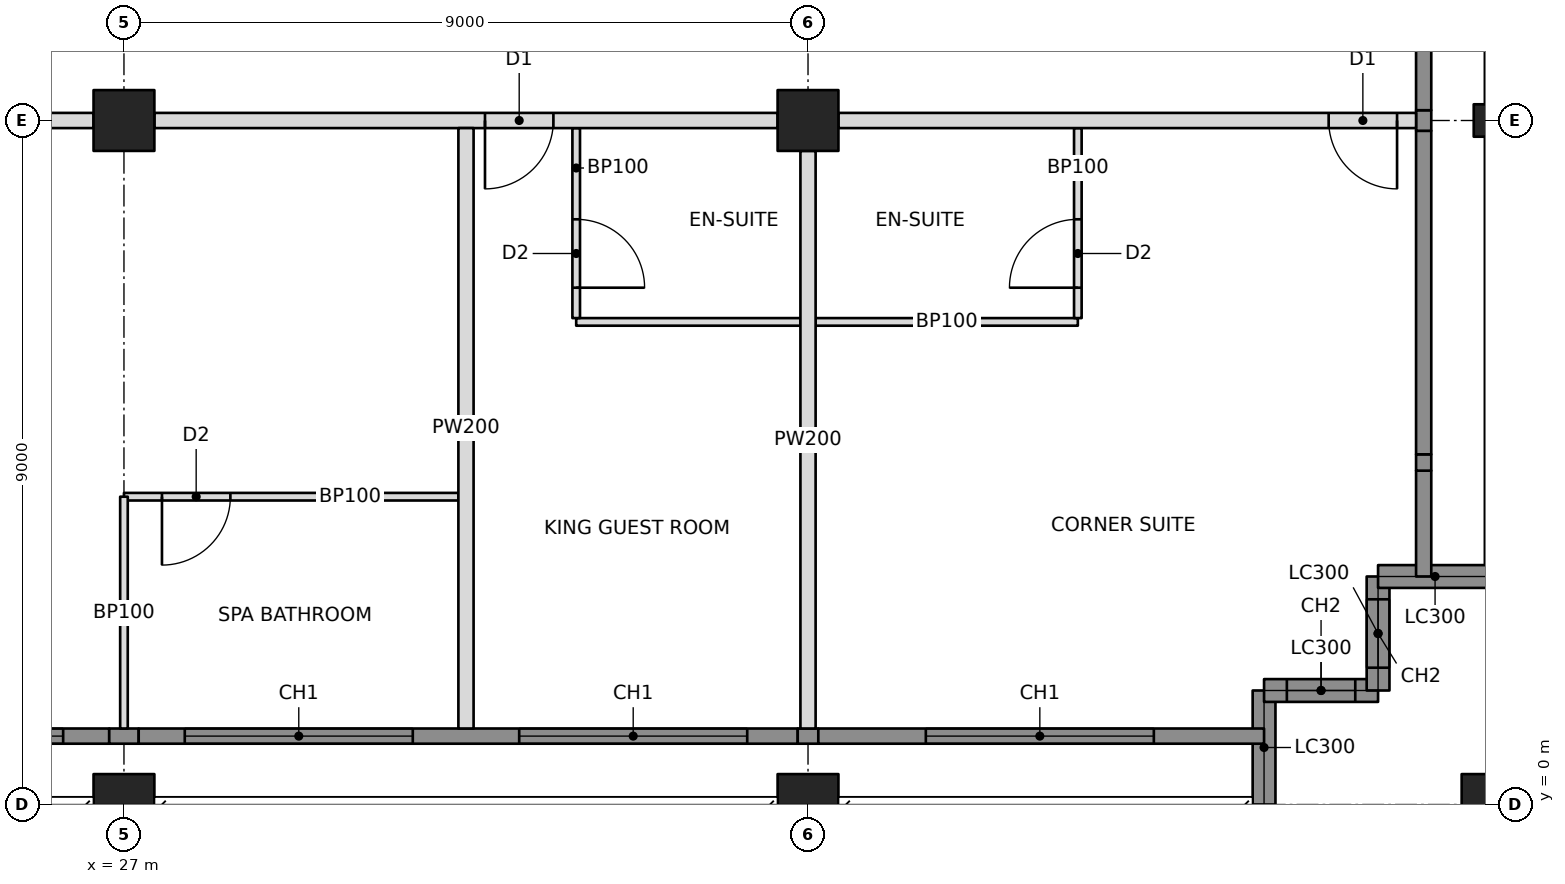
"""IFC4 building model, lengths in metres.
Left out: names, types, materials, properties, quantities, classifications, styles, units other than length and angle.
Written with IfcOpenShell. Run it as: python <this file> out.ifc"""

import sys

from ifc_helpers import new_model, si_unit, direction, frame, frame_2d, origin, origin_2d, place, context, subcontext, project, spatial, rectangle, hollow_rectangle, i_section, extrude, element, fill, save


model = new_model("IFC4")
c1 = context("Model", 3, precision=1e-05, world=origin(), true_north=direction((0.0, 1.0)))
c2 = subcontext(c1, "Body", "Model", "MODEL_VIEW")
j1 = project(units=[si_unit("LENGTHUNIT", "METRE"), si_unit("PLANEANGLEUNIT", "RADIAN")], contexts=[c1])
p1 = place(None, origin())
s1 = spatial("IfcSite", under=j1, at=p1, CompositionType="ELEMENT")
p2 = place(p1, origin())
s2 = spatial("IfcBuilding", under=s1, at=p2, CompositionType="ELEMENT")
p3 = place(p2, frame((0.0, 0.0, 208.0)))
s3 = spatial("IfcBuildingStorey", under=s2, at=p3, CompositionType="ELEMENT", Elevation=208.0)
p4 = place(p3, frame((27.0, 0.0, 0.0), z_axis=(0.0, 0.0, 1.0), x_axis=(1.0, 0.0, 0.0)))
e1 = element("IfcColumn", 1, at=p4, inside=s3, PredefinedType="COLUMN", context=c2, shape_type="SweptSolid", body=[
    extrude(hollow_rectangle(XDim=0.8, YDim=0.8, WallThickness=0.06, at=origin_2d()), origin(), (0.0, 0.0, 1.0), 3.4),
])
p5 = place(p3, frame((27.0, 9.0, 0.0), z_axis=(0.0, 0.0, 1.0), x_axis=(1.0, 0.0, 0.0)))
e2 = element("IfcColumn", 2, at=p5, inside=s3, PredefinedType="COLUMN", context=c2, shape_type="SweptSolid", body=[
    extrude(hollow_rectangle(XDim=0.8, YDim=0.8, WallThickness=0.05, at=origin_2d()), origin(), (0.0, 0.0, 1.0), 3.4),
])
p6 = place(p3, frame((36.0, 0.0, 0.0), z_axis=(0.0, 0.0, 1.0), x_axis=(1.0, 0.0, 0.0)))
e3 = element("IfcColumn", 3, at=p6, inside=s3, PredefinedType="COLUMN", context=c2, shape_type="SweptSolid", body=[
    extrude(hollow_rectangle(XDim=0.8, YDim=0.8, WallThickness=0.06, at=origin_2d()), origin(), (0.0, 0.0, 1.0), 3.4),
])
p7 = place(p3, frame((36.0, 9.0, 0.0), z_axis=(0.0, 0.0, 1.0), x_axis=(0.0, 1.0, 0.0)))
e4 = element("IfcColumn", 4, at=p7, inside=s3, PredefinedType="COLUMN", context=c2, shape_type="SweptSolid", body=[
    extrude(hollow_rectangle(XDim=0.8, YDim=0.8, WallThickness=0.05, at=origin_2d()), origin(), (0.0, 0.0, 1.0), 3.4),
])
p8 = place(p3, frame((45.0, 0.0, 0.0), z_axis=(0.0, 0.0, 1.0), x_axis=(1.0, 0.0, 0.0)))
e5 = element("IfcColumn", 5, at=p8, inside=s3, PredefinedType="COLUMN", context=c2, shape_type="SweptSolid", body=[
    extrude(hollow_rectangle(XDim=0.8, YDim=0.8, WallThickness=0.06, at=origin_2d()), origin(), (0.0, 0.0, 1.0), 3.4),
])
p9 = place(p3, frame((45.0, 9.0, 0.0), z_axis=(0.0, 0.0, 1.0), x_axis=(0.0, 1.0, 0.0)))
e6 = element("IfcColumn", 6, at=p9, inside=s3, PredefinedType="COLUMN", context=c2, shape_type="SweptSolid", body=[
    extrude(i_section(OverallWidth=0.427, OverallDepth=0.483, WebThickness=0.051, FlangeThickness=0.082, at=origin_2d()), origin(), (0.0, 0.0, 1.0), 3.4),
])
p10 = place(p3, frame((42.0, 0.0, 0.0), z_axis=(0.0, 0.0, 1.0), x_axis=(0.0, 1.0, 0.0)))
e7 = element("IfcWall", 7, at=p10, inside=s3, PredefinedType="SOLIDWALL", context=c2, shape_type="SweptSolid", body=[
    extrude(rectangle(XDim=1.5, YDim=0.3, at=frame_2d((0.75, 0.0))), origin(), (0.0, 0.0, 1.0), 2.42),
])
p11 = place(p3, frame((42.0, 1.5, 0.0), z_axis=(0.0, 0.0, 1.0), x_axis=(1.0, 0.0, 0.0)))
e8 = element("IfcWall", 8, at=p11, inside=s3, PredefinedType="SOLIDWALL", context=c2, shape_type="SweptSolid", body=[
    extrude(rectangle(XDim=1.5, YDim=0.3, at=frame_2d((0.75, 0.0))), origin(), (0.0, 0.0, 1.0), 3.2),
])
p12 = place(p11, frame((0.3, 0.0, 0.6)))
e9 = element("IfcOpeningElement", 9, at=p12, cuts=e8, PredefinedType="OPENING", context=c2, shape_type="SweptSolid", body=[
    extrude(rectangle(XDim=0.9, YDim=2.2, at=frame_2d((0.45, 1.1))), frame((0.0, 0.16, 0.0), z_axis=(0.0, -1.0, 0.0), x_axis=(1.0, 0.0, 0.0)), (0.0, 0.0, 1.0), 0.32),
])
p13 = place(p3, frame((43.5, 1.5, 0.0), z_axis=(0.0, 0.0, 1.0), x_axis=(0.0, 1.0, 0.0)))
e10 = element("IfcWall", 10, at=p13, inside=s3, PredefinedType="SOLIDWALL", context=c2, shape_type="SweptSolid", body=[
    extrude(rectangle(XDim=1.5, YDim=0.3, at=frame_2d((0.75, 0.0))), origin(), (0.0, 0.0, 1.0), 3.2),
])
p14 = place(p13, frame((0.3, 0.0, 0.6)))
e11 = element("IfcOpeningElement", 11, at=p14, cuts=e10, PredefinedType="OPENING", context=c2, shape_type="SweptSolid", body=[
    extrude(rectangle(XDim=0.9, YDim=2.2, at=frame_2d((0.45, 1.1))), frame((0.0, 0.16, 0.0), z_axis=(0.0, -1.0, 0.0), x_axis=(1.0, 0.0, 0.0)), (0.0, 0.0, 1.0), 0.32),
])
p15 = place(p3, frame((43.5, 3.0, 0.0), z_axis=(0.0, 0.0, 1.0), x_axis=(1.0, 0.0, 0.0)))
e12 = element("IfcWall", 12, at=p15, inside=s3, PredefinedType="SOLIDWALL", context=c2, shape_type="SweptSolid", body=[
    extrude(rectangle(XDim=1.5, YDim=0.3, at=frame_2d((0.75, 0.0))), origin(), (0.0, 0.0, 1.0), 2.42),
])
p16 = place(p3, frame((44.1, 3.0, 0.0), z_axis=(0.0, 0.0, 1.0), x_axis=(0.0, 1.0, 0.0)))
e13 = element("IfcWall", 13, at=p16, inside=s3, PredefinedType="SOLIDWALL", context=c2, shape_type="SweptSolid", body=[
    extrude(rectangle(XDim=1.393, YDim=0.2, at=frame_2d((0.696, 0.0))), origin(), (0.0, 0.0, 1.0), 3.2),
])
p17 = place(p3, frame((18.4, 9.0, 0.0), z_axis=(0.0, 0.0, 1.0), x_axis=(1.0, 0.0, 0.0)))
e14 = element("IfcWall", 14, at=p17, inside=s3, PredefinedType="PARTITIONING", context=c2, shape_type="SweptSolid", body=[
    extrude(rectangle(XDim=8.2, YDim=0.2, at=frame_2d((4.1, 0.0))), origin(), (0.0, 0.0, 1.0), 2.405),
])
p18 = place(p17, frame((4.35, 0.0, 0.0)))
e15 = element("IfcOpeningElement", 15, at=p18, cuts=e14, PredefinedType="OPENING", context=c2, shape_type="SweptSolid", body=[
    extrude(rectangle(XDim=0.9, YDim=2.1, at=frame_2d((0.45, 1.05))), frame((0.0, 0.11, 0.0), z_axis=(0.0, -1.0, 0.0), x_axis=(1.0, 0.0, 0.0)), (0.0, 0.0, 1.0), 0.22),
])
p19 = place(p3, frame((27.4, 9.0, 0.0), z_axis=(0.0, 0.0, 1.0), x_axis=(1.0, 0.0, 0.0)))
e16 = element("IfcWall", 16, at=p19, inside=s3, PredefinedType="PARTITIONING", context=c2, shape_type="SweptSolid", body=[
    extrude(rectangle(XDim=8.2, YDim=0.2, at=frame_2d((4.1, 0.0))), origin(), (0.0, 0.0, 1.0), 2.405),
])
p20 = place(p19, frame((4.35, 0.0, 0.0)))
e17 = element("IfcOpeningElement", 17, at=p20, cuts=e16, PredefinedType="OPENING", context=c2, shape_type="SweptSolid", body=[
    extrude(rectangle(XDim=0.9, YDim=2.1, at=frame_2d((0.45, 1.05))), frame((0.0, 0.11, 0.0), z_axis=(0.0, -1.0, 0.0), x_axis=(1.0, 0.0, 0.0)), (0.0, 0.0, 1.0), 0.22),
])
p21 = place(p3, frame((36.4, 9.0, 0.0), z_axis=(0.0, 0.0, 1.0), x_axis=(1.0, 0.0, 0.0)))
e18 = element("IfcWall", 18, at=p21, inside=s3, PredefinedType="PARTITIONING", context=c2, shape_type="SweptSolid", body=[
    extrude(rectangle(XDim=7.6, YDim=0.2, at=frame_2d((3.8, 0.0))), origin(), (0.0, 0.0, 1.0), 2.438),
])
p22 = place(p21, frame((6.45, 0.0, 0.0)))
e19 = element("IfcOpeningElement", 19, at=p22, cuts=e18, PredefinedType="OPENING", context=c2, shape_type="SweptSolid", body=[
    extrude(rectangle(XDim=0.9, YDim=2.1, at=frame_2d((0.45, 1.05))), frame((0.0, 0.11, 0.0), z_axis=(0.0, -1.0, 0.0), x_axis=(1.0, 0.0, 0.0)), (0.0, 0.0, 1.0), 0.22),
])
p23 = place(p3, frame((31.5, 8.9, 0.0), z_axis=(0.0, 0.0, 1.0), x_axis=(0.0, -1.0, 0.0)))
e20 = element("IfcWall", 20, at=p23, inside=s3, PredefinedType="PARTITIONING", context=c2, shape_type="SweptSolid", body=[
    extrude(rectangle(XDim=7.9, YDim=0.2, at=frame_2d((3.95, 0.0))), origin(), (0.0, 0.0, 1.0), 2.404),
])
p24 = place(p3, frame((36.0, 8.6, 0.0), z_axis=(0.0, 0.0, 1.0), x_axis=(0.0, -1.0, 0.0)))
e21 = element("IfcWall", 21, at=p24, inside=s3, PredefinedType="PARTITIONING", context=c2, shape_type="SweptSolid", body=[
    extrude(rectangle(XDim=7.6, YDim=0.2, at=frame_2d((3.8, 0.0))), origin(), (0.0, 0.0, 1.0), 2.438),
])
p25 = place(p3, frame((27.0, 4.05, 0.0), z_axis=(0.0, 0.0, 1.0), x_axis=(1.0, 0.0, 0.0)))
e22 = element("IfcWall", 22, at=p25, inside=s3, PredefinedType="PARTITIONING", context=c2, shape_type="SweptSolid", body=[
    extrude(rectangle(XDim=4.4, YDim=0.1, at=frame_2d((2.2, 0.0))), origin(), (0.0, 0.0, 1.0), 2.404),
])
p26 = place(p25, frame((0.5, 0.0, 0.0)))
e23 = element("IfcOpeningElement", 23, at=p26, cuts=e22, PredefinedType="OPENING", context=c2, shape_type="SweptSolid", body=[
    extrude(rectangle(XDim=0.9, YDim=2.1, at=frame_2d((0.45, 1.05))), frame((0.0, 0.06, 0.0), z_axis=(0.0, -1.0, 0.0), x_axis=(1.0, 0.0, 0.0)), (0.0, 0.0, 1.0), 0.12),
])
p27 = place(p3, frame((27.0, 4.05, 0.0), z_axis=(0.0, 0.0, 1.0), x_axis=(0.0, -1.0, 0.0)))
e24 = element("IfcWall", 24, at=p27, inside=s3, PredefinedType="PARTITIONING", context=c2, shape_type="SweptSolid", body=[
    extrude(rectangle(XDim=3.05, YDim=0.1, at=frame_2d((1.525, 0.0))), origin(), (0.0, 0.0, 1.0), 2.405),
])
p28 = place(p3, frame((32.95, 6.35, 0.0), z_axis=(0.0, 0.0, 1.0), x_axis=(1.0, 0.0, 0.0)))
e25 = element("IfcWall", 25, at=p28, inside=s3, PredefinedType="PARTITIONING", context=c2, shape_type="SweptSolid", body=[
    extrude(rectangle(XDim=2.95, YDim=0.1, at=frame_2d((1.475, 0.0))), origin(), (0.0, 0.0, 1.0), 2.438),
])
p29 = place(p3, frame((32.95, 8.9, 0.0), z_axis=(0.0, 0.0, 1.0), x_axis=(0.0, -1.0, 0.0)))
e26 = element("IfcWall", 26, at=p29, inside=s3, PredefinedType="PARTITIONING", context=c2, shape_type="SweptSolid", body=[
    extrude(rectangle(XDim=2.5, YDim=0.1, at=frame_2d((1.25, 0.0))), origin(), (0.0, 0.0, 1.0), 2.404),
])
p30 = place(p29, frame((1.2, 0.0, 0.0)))
e27 = element("IfcOpeningElement", 27, at=p30, cuts=e26, PredefinedType="OPENING", context=c2, shape_type="SweptSolid", body=[
    extrude(rectangle(XDim=0.9, YDim=2.1, at=frame_2d((0.45, 1.05))), frame((0.0, 0.06, 0.0), z_axis=(0.0, -1.0, 0.0), x_axis=(1.0, 0.0, 0.0)), (0.0, 0.0, 1.0), 0.12),
])
p31 = place(p3, frame((36.1, 6.35, 0.0), z_axis=(0.0, 0.0, 1.0), x_axis=(1.0, 0.0, 0.0)))
e28 = element("IfcWall", 28, at=p31, inside=s3, PredefinedType="PARTITIONING", context=c2, shape_type="SweptSolid", body=[
    extrude(rectangle(XDim=3.45, YDim=0.1, at=frame_2d((1.725, 0.0))), origin(), (0.0, 0.0, 1.0), 2.438),
])
p32 = place(p3, frame((39.55, 8.9, 0.0), z_axis=(0.0, 0.0, 1.0), x_axis=(0.0, -1.0, 0.0)))
e29 = element("IfcWall", 29, at=p32, inside=s3, PredefinedType="PARTITIONING", context=c2, shape_type="SweptSolid", body=[
    extrude(rectangle(XDim=2.5, YDim=0.1, at=frame_2d((1.25, 0.0))), origin(), (0.0, 0.0, 1.0), 2.438),
])
p33 = place(p32, frame((1.2, 0.0, 0.0)))
e30 = element("IfcOpeningElement", 30, at=p33, cuts=e29, PredefinedType="OPENING", context=c2, shape_type="SweptSolid", body=[
    extrude(rectangle(XDim=0.9, YDim=2.1, at=frame_2d((0.45, 1.05))), frame((0.0, 0.06, 0.0), z_axis=(0.0, -1.0, 0.0), x_axis=(1.0, 0.0, 0.0)), (0.0, 0.0, 1.0), 0.12),
])
p34 = place(p3, frame((18.194, 0.9, 0.0), z_axis=(0.0, 0.0, 1.0), x_axis=(1.0, 0.0, 0.0)))
e31 = element("IfcWall", 31, at=p34, inside=s3, PredefinedType="SOLIDWALL", context=c2, shape_type="SweptSolid", body=[
    extrude(rectangle(XDim=8.612, YDim=0.2, at=frame_2d((4.306, 0.0))), origin(), (0.0, 0.0, 1.0), 3.2),
])
p35 = place(p34, frame((0.606, 0.0, 0.6)))
e32 = element("IfcOpeningElement", 32, at=p35, cuts=e31, PredefinedType="OPENING", context=c2, shape_type="SweptSolid", body=[
    extrude(rectangle(XDim=3.0, YDim=2.2, at=frame_2d((1.5, 1.1))), frame((0.0, 0.11, 0.0), z_axis=(0.0, -1.0, 0.0), x_axis=(1.0, 0.0, 0.0)), (0.0, 0.0, 1.0), 0.22),
])
p36 = place(p34, frame((5.006, 0.0, 0.6)))
e33 = element("IfcOpeningElement", 33, at=p36, cuts=e31, PredefinedType="OPENING", context=c2, shape_type="SweptSolid", body=[
    extrude(rectangle(XDim=3.0, YDim=2.2, at=frame_2d((1.5, 1.1))), frame((0.0, 0.11, 0.0), z_axis=(0.0, -1.0, 0.0), x_axis=(1.0, 0.0, 0.0)), (0.0, 0.0, 1.0), 0.22),
])
p37 = place(p3, frame((26.806, 0.9, 0.0), z_axis=(0.0, 0.0, 1.0), x_axis=(1.0, 0.0, 0.0)))
e34 = element("IfcWall", 34, at=p37, inside=s3, PredefinedType="SOLIDWALL", context=c2, shape_type="SweptSolid", body=[
    extrude(rectangle(XDim=0.388, YDim=0.2, at=frame_2d((0.194, 0.0))), origin(), (0.0, 0.0, 1.0), 2.404),
])
p38 = place(p3, frame((27.194, 0.9, 0.0), z_axis=(0.0, 0.0, 1.0), x_axis=(1.0, 0.0, 0.0)))
e35 = element("IfcWall", 35, at=p38, inside=s3, PredefinedType="SOLIDWALL", context=c2, shape_type="SweptSolid", body=[
    extrude(rectangle(XDim=8.671, YDim=0.2, at=frame_2d((4.335, 0.0))), origin(), (0.0, 0.0, 1.0), 3.2),
])
p39 = place(p38, frame((0.606, 0.0, 0.6)))
e36 = element("IfcOpeningElement", 36, at=p39, cuts=e35, PredefinedType="OPENING", context=c2, shape_type="SweptSolid", body=[
    extrude(rectangle(XDim=3.0, YDim=2.2, at=frame_2d((1.5, 1.1))), frame((0.0, 0.11, 0.0), z_axis=(0.0, -1.0, 0.0), x_axis=(1.0, 0.0, 0.0)), (0.0, 0.0, 1.0), 0.22),
])
p40 = place(p38, frame((5.006, 0.0, 0.6)))
e37 = element("IfcOpeningElement", 37, at=p40, cuts=e35, PredefinedType="OPENING", context=c2, shape_type="SweptSolid", body=[
    extrude(rectangle(XDim=3.0, YDim=2.2, at=frame_2d((1.5, 1.1))), frame((0.0, 0.11, 0.0), z_axis=(0.0, -1.0, 0.0), x_axis=(1.0, 0.0, 0.0)), (0.0, 0.0, 1.0), 0.22),
])
p41 = place(p3, frame((35.865, 0.9, 0.0), z_axis=(0.0, 0.0, 1.0), x_axis=(1.0, 0.0, 0.0)))
e38 = element("IfcWall", 38, at=p41, inside=s3, PredefinedType="SOLIDWALL", context=c2, shape_type="SweptSolid", body=[
    extrude(rectangle(XDim=0.271, YDim=0.2, at=frame_2d((0.135, 0.0))), origin(), (0.0, 0.0, 1.0), 2.438),
])
p42 = place(p3, frame((36.135, 0.9, 0.0), z_axis=(0.0, 0.0, 1.0), x_axis=(1.0, 0.0, 0.0)))
e39 = element("IfcWall", 39, at=p42, inside=s3, PredefinedType="SOLIDWALL", context=c2, shape_type="SweptSolid", body=[
    extrude(rectangle(XDim=5.865, YDim=0.2, at=frame_2d((2.932, 0.0))), origin(), (0.0, 0.0, 1.0), 3.2),
])
p43 = place(p42, frame((1.415, 0.0, 0.6)))
e40 = element("IfcOpeningElement", 40, at=p43, cuts=e39, PredefinedType="OPENING", context=c2, shape_type="SweptSolid", body=[
    extrude(rectangle(XDim=3.0, YDim=2.2, at=frame_2d((1.5, 1.1))), frame((0.0, 0.11, 0.0), z_axis=(0.0, -1.0, 0.0), x_axis=(1.0, 0.0, 0.0)), (0.0, 0.0, 1.0), 0.22),
])
p44 = place(p3, frame((44.1, 4.393, 0.0), z_axis=(0.0, 0.0, 1.0), x_axis=(0.0, 1.0, 0.0)))
e41 = element("IfcWall", 41, at=p44, inside=s3, PredefinedType="SOLIDWALL", context=c2, shape_type="SweptSolid", body=[
    extrude(rectangle(XDim=0.215, YDim=0.2, at=frame_2d((0.107, 0.0))), origin(), (0.0, 0.0, 1.0), 2.661),
])
p45 = place(p3, frame((44.1, 4.607, 0.0), z_axis=(0.0, 0.0, 1.0), x_axis=(0.0, 1.0, 0.0)))
e42 = element("IfcWall", 42, at=p45, inside=s3, PredefinedType="SOLIDWALL", context=c2, shape_type="SweptSolid", body=[
    extrude(rectangle(XDim=4.257, YDim=0.2, at=frame_2d((2.129, 0.0))), origin(), (0.0, 0.0, 1.0), 3.2),
])
p46 = place(p3, frame((44.1, 8.865, 0.0), z_axis=(0.0, 0.0, 1.0), x_axis=(0.0, 1.0, 0.0)))
e43 = element("IfcWall", 43, at=p46, inside=s3, PredefinedType="SOLIDWALL", context=c2, shape_type="SweptSolid", body=[
    extrude(rectangle(XDim=0.271, YDim=0.2, at=frame_2d((0.135, 0.0))), origin(), (0.0, 0.0, 1.0), 2.438),
])
p47 = place(p3, frame((44.1, 9.135, 0.0), z_axis=(0.0, 0.0, 1.0), x_axis=(0.0, 1.0, 0.0)))
e44 = element("IfcWall", 44, at=p47, inside=s3, PredefinedType="SOLIDWALL", context=c2, shape_type="SweptSolid", body=[
    extrude(rectangle(XDim=8.671, YDim=0.2, at=frame_2d((4.335, 0.0))), origin(), (0.0, 0.0, 1.0), 3.2),
])
p48 = place(p47, frame((2.015, 0.0, 0.6)))
e45 = element("IfcOpeningElement", 45, at=p48, cuts=e44, PredefinedType="OPENING", context=c2, shape_type="SweptSolid", body=[
    extrude(rectangle(XDim=3.0, YDim=2.2, at=frame_2d((1.5, 1.1))), frame((0.0, 0.11, 0.0), z_axis=(0.0, -1.0, 0.0), x_axis=(1.0, 0.0, 0.0)), (0.0, 0.0, 1.0), 0.22),
])
p49 = place(p47, frame((5.515, 0.0, 0.6)))
e46 = element("IfcOpeningElement", 46, at=p49, cuts=e44, PredefinedType="OPENING", context=c2, shape_type="SweptSolid", body=[
    extrude(rectangle(XDim=3.0, YDim=2.2, at=frame_2d((1.5, 1.1))), frame((0.0, 0.11, 0.0), z_axis=(0.0, -1.0, 0.0), x_axis=(1.0, 0.0, 0.0)), (0.0, 0.0, 1.0), 0.22),
])
p50 = place(p12, origin())
e47 = element("IfcWindow", 47, at=p50, inside=s3, PartitioningType="SINGLE_PANEL", PredefinedType="WINDOW", context=c2, shape_type="SweptSolid", body=[
    extrude(rectangle(XDim=0.9, YDim=2.2, at=frame_2d((0.45, 1.1))), frame((0.0, 0.03, 0.0), z_axis=(0.0, -1.0, 0.0), x_axis=(1.0, 0.0, 0.0)), (0.0, 0.0, 1.0), 0.06),
])
fill(e9, e47)
p51 = place(p14, origin())
e48 = element("IfcWindow", 48, at=p51, inside=s3, PartitioningType="SINGLE_PANEL", PredefinedType="WINDOW", context=c2, shape_type="SweptSolid", body=[
    extrude(rectangle(XDim=0.9, YDim=2.2, at=frame_2d((0.45, 1.1))), frame((0.0, 0.03, 0.0), z_axis=(0.0, -1.0, 0.0), x_axis=(1.0, 0.0, 0.0)), (0.0, 0.0, 1.0), 0.06),
])
fill(e11, e48)
p52 = place(p36, origin())
e49 = element("IfcWindow", 49, at=p52, inside=s3, PartitioningType="TRIPLE_PANEL_VERTICAL", PredefinedType="WINDOW", context=c2, shape_type="SweptSolid", body=[
    extrude(rectangle(XDim=3.0, YDim=2.2, at=frame_2d((1.5, 1.1))), frame((0.0, 0.03, 0.0), z_axis=(0.0, -1.0, 0.0), x_axis=(1.0, 0.0, 0.0)), (0.0, 0.0, 1.0), 0.06),
])
fill(e33, e49)
p53 = place(p39, origin())
e50 = element("IfcWindow", 50, at=p53, inside=s3, PartitioningType="TRIPLE_PANEL_VERTICAL", PredefinedType="WINDOW", context=c2, shape_type="SweptSolid", body=[
    extrude(rectangle(XDim=3.0, YDim=2.2, at=frame_2d((1.5, 1.1))), frame((0.0, 0.03, 0.0), z_axis=(0.0, -1.0, 0.0), x_axis=(1.0, 0.0, 0.0)), (0.0, 0.0, 1.0), 0.06),
])
fill(e36, e50)
p54 = place(p40, origin())
e51 = element("IfcWindow", 51, at=p54, inside=s3, PartitioningType="TRIPLE_PANEL_VERTICAL", PredefinedType="WINDOW", context=c2, shape_type="SweptSolid", body=[
    extrude(rectangle(XDim=3.0, YDim=2.2, at=frame_2d((1.5, 1.1))), frame((0.0, 0.03, 0.0), z_axis=(0.0, -1.0, 0.0), x_axis=(1.0, 0.0, 0.0)), (0.0, 0.0, 1.0), 0.06),
])
fill(e37, e51)
p55 = place(p43, origin())
e52 = element("IfcWindow", 52, at=p55, inside=s3, PartitioningType="TRIPLE_PANEL_VERTICAL", PredefinedType="WINDOW", context=c2, shape_type="SweptSolid", body=[
    extrude(rectangle(XDim=3.0, YDim=2.2, at=frame_2d((1.5, 1.1))), frame((0.0, 0.03, 0.0), z_axis=(0.0, -1.0, 0.0), x_axis=(1.0, 0.0, 0.0)), (0.0, 0.0, 1.0), 0.06),
])
fill(e40, e52)
p56 = place(p26, frame((0.9, 0.0, 0.0), z_axis=(0.0, 0.0, 1.0), x_axis=(-1.0, 0.0, 0.0)))
e53 = element("IfcDoor", 53, at=p56, inside=s3, OperationType="SINGLE_SWING_RIGHT", PredefinedType="DOOR", context=c2, shape_type="SweptSolid", body=[
    extrude(rectangle(XDim=0.9, YDim=2.1, at=frame_2d((0.45, 1.05))), frame((0.0, 0.025, 0.0), z_axis=(0.0, -1.0, 0.0), x_axis=(1.0, 0.0, 0.0)), (0.0, 0.0, 1.0), 0.05),
])
fill(e23, e53)
p57 = place(p30, origin())
e54 = element("IfcDoor", 54, at=p57, inside=s3, OperationType="SINGLE_SWING_RIGHT", PredefinedType="DOOR", context=c2, shape_type="SweptSolid", body=[
    extrude(rectangle(XDim=0.9, YDim=2.1, at=frame_2d((0.45, 1.05))), frame((0.0, 0.025, 0.0), z_axis=(0.0, -1.0, 0.0), x_axis=(1.0, 0.0, 0.0)), (0.0, 0.0, 1.0), 0.05),
])
fill(e27, e54)
p58 = place(p20, frame((0.9, 0.0, 0.0), z_axis=(0.0, 0.0, 1.0), x_axis=(-1.0, 0.0, 0.0)))
e55 = element("IfcDoor", 55, at=p58, inside=s3, OperationType="SINGLE_SWING_RIGHT", PredefinedType="DOOR", context=c2, shape_type="SweptSolid", body=[
    extrude(rectangle(XDim=0.9, YDim=2.1, at=frame_2d((0.45, 1.05))), frame((0.0, 0.025, 0.0), z_axis=(0.0, -1.0, 0.0), x_axis=(1.0, 0.0, 0.0)), (0.0, 0.0, 1.0), 0.05),
])
fill(e17, e55)
p59 = place(p33, frame((0.9, 0.0, 0.0), z_axis=(0.0, 0.0, 1.0), x_axis=(-1.0, 0.0, 0.0)))
e56 = element("IfcDoor", 56, at=p59, inside=s3, OperationType="SINGLE_SWING_LEFT", PredefinedType="DOOR", context=c2, shape_type="SweptSolid", body=[
    extrude(rectangle(XDim=0.9, YDim=2.1, at=frame_2d((0.45, 1.05))), frame((0.0, 0.025, 0.0), z_axis=(0.0, -1.0, 0.0), x_axis=(1.0, 0.0, 0.0)), (0.0, 0.0, 1.0), 0.05),
])
fill(e30, e56)
p60 = place(p22, frame((0.9, 0.0, 0.0), z_axis=(0.0, 0.0, 1.0), x_axis=(-1.0, 0.0, 0.0)))
e57 = element("IfcDoor", 57, at=p60, inside=s3, OperationType="SINGLE_SWING_LEFT", PredefinedType="DOOR", context=c2, shape_type="SweptSolid", body=[
    extrude(rectangle(XDim=0.9, YDim=2.1, at=frame_2d((0.45, 1.05))), frame((0.0, 0.025, 0.0), z_axis=(0.0, -1.0, 0.0), x_axis=(1.0, 0.0, 0.0)), (0.0, 0.0, 1.0), 0.05),
])
fill(e19, e57)
save(model, sys.argv[1])
